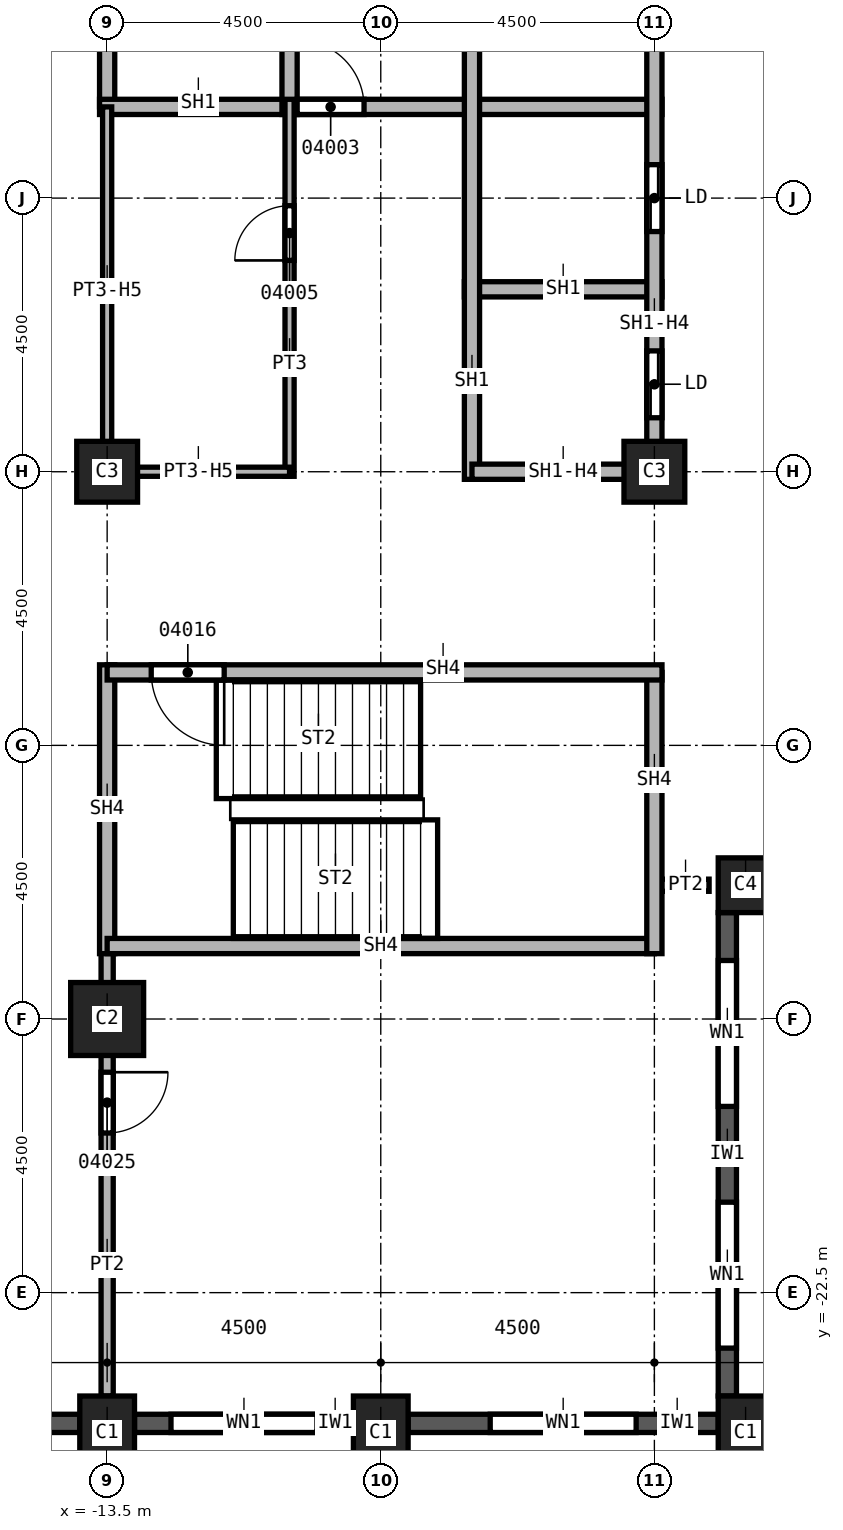
"""IFC4 building model, lengths in metres.
Left out: names, types, materials, properties, quantities, classifications, styles, units other than length and angle.
Written with IfcOpenShell. Run it as: python <this file> out.ifc"""

import sys

from ifc_helpers import new_model, si_unit, direction, frame, frame_2d, origin, origin_2d, place, context, subcontext, project, spatial, rectangle, extrude, element, fill, save


model = new_model("IFC4")
c1 = context("Model", 3, precision=1e-05, world=origin(), true_north=direction((0.0, 1.0)))
c2 = subcontext(c1, "Body", "Model", "MODEL_VIEW")
j1 = project(units=[si_unit("LENGTHUNIT", "METRE"), si_unit("PLANEANGLEUNIT", "RADIAN")], contexts=[c1])
p1 = place(None, origin())
s1 = spatial("IfcSite", under=j1, at=p1, CompositionType="ELEMENT")
p2 = place(p1, origin())
s2 = spatial("IfcBuilding", under=s1, at=p2, CompositionType="ELEMENT")
p3 = place(p2, frame((0.0, 0.0, 104.0)))
s3 = spatial("IfcBuildingStorey", under=s2, at=p3, CompositionType="ELEMENT", Elevation=104.0)
p4 = place(p3, frame((-13.5, -18.0, 0.0), z_axis=(0.0, 0.0, 1.0), x_axis=(1.0, 0.0, 0.0)))
e1 = element("IfcColumn", 1, at=p4, inside=s3, PredefinedType="COLUMN", context=c2, shape_type="SweptSolid", body=[
    extrude(rectangle(XDim=1.2, YDim=1.2, at=origin_2d()), origin(), (0.0, 0.0, 1.0), 3.7),
])
for number, where, z_axis, x_axis in (
    (2, (-4.5, -9.0, 0.0), (0.0, 0.0, 1.0), (1.0, 0.0, 0.0)),
    (3, (-13.5, -9.0, 0.0), (0.0, 0.0, 1.0), (1.0, 0.0, 0.0)),
):
    element("IfcColumn", number, at=place(p3, frame(where, z_axis=z_axis, x_axis=x_axis)), inside=s3, PredefinedType="COLUMN", context=c2, shape_type="SweptSolid", body=[
        extrude(rectangle(XDim=1.0, YDim=1.0, at=origin_2d()), origin(), (0.0, 0.0, 1.0), 3.7),
    ])
for number, where, z_axis, x_axis in (
    (4, (-3.0, -24.8, 0.0), (0.0, 0.0, 1.0), (1.0, 0.0, 0.0)),
    (5, (-9.0, -24.8, 0.0), (0.0, 0.0, 1.0), (1.0, 0.0, 0.0)),
    (6, (-13.5, -24.8, 0.0), (0.0, 0.0, 1.0), (1.0, 0.0, 0.0)),
):
    element("IfcColumn", number, at=place(p3, frame(where, z_axis=z_axis, x_axis=x_axis)), inside=s3, PredefinedType="COLUMN", context=c2, shape_type="SweptSolid", body=[
        extrude(rectangle(XDim=0.9, YDim=1.2, at=origin_2d()), origin(), (0.0, 0.0, 1.0), 3.7),
    ])
p5 = place(p3, frame((-3.0, -15.8, 0.0), z_axis=(0.0, 0.0, 1.0), x_axis=(1.0, 0.0, 0.0)))
e7 = element("IfcColumn", 7, at=p5, inside=s3, PredefinedType="COLUMN", context=c2, shape_type="SweptSolid", body=[
    extrude(rectangle(XDim=0.9, YDim=0.9, at=origin_2d()), origin(), (0.0, 0.0, 1.0), 3.7),
])
p6 = place(p3, frame((-17.55, -24.65, 0.0), z_axis=(0.0, 0.0, 1.0), x_axis=(1.0, 0.0, 0.0)))
e8 = element("IfcWall", 8, at=p6, inside=s3, PredefinedType="SOLIDWALL", context=c2, shape_type="SweptSolid", body=[
    extrude(rectangle(XDim=3.6, YDim=0.3, at=frame_2d((1.8, 0.0))), origin(), (0.0, 0.0, 1.0), 3.1),
])
p7 = place(p6, frame((0.775, 0.0, 0.8)))
e9 = element("IfcOpeningElement", 9, at=p7, cuts=e8, PredefinedType="OPENING", context=c2, shape_type="SweptSolid", body=[
    extrude(rectangle(XDim=1.0, YDim=1.95, at=frame_2d((0.5, 0.975))), frame((0.0, 0.15, 0.0), z_axis=(0.0, -1.0, 0.0), x_axis=(1.0, 0.0, 0.0)), (0.0, 0.0, 1.0), 0.3),
])
p8 = place(p6, frame((2.375, 0.0, 0.8)))
e10 = element("IfcOpeningElement", 10, at=p8, cuts=e8, PredefinedType="OPENING", context=c2, shape_type="SweptSolid", body=[
    extrude(rectangle(XDim=0.6, YDim=1.95, at=frame_2d((0.3, 0.975))), frame((0.0, 0.15, 0.0), z_axis=(0.0, -1.0, 0.0), x_axis=(1.0, 0.0, 0.0)), (0.0, 0.0, 1.0), 0.3),
])
p9 = place(p3, frame((-13.05, -24.65, 0.0), z_axis=(0.0, 0.0, 1.0), x_axis=(1.0, 0.0, 0.0)))
e11 = element("IfcWall", 11, at=p9, inside=s3, PredefinedType="SOLIDWALL", context=c2, shape_type="SweptSolid", body=[
    extrude(rectangle(XDim=3.6, YDim=0.3, at=frame_2d((1.8, 0.0))), origin(), (0.0, 0.0, 1.0), 3.1),
])
p10 = place(p9, frame((0.6, 0.0, 0.8)))
e12 = element("IfcOpeningElement", 12, at=p10, cuts=e11, PredefinedType="OPENING", context=c2, shape_type="SweptSolid", body=[
    extrude(rectangle(XDim=2.4, YDim=1.95, at=frame_2d((1.2, 0.975))), frame((0.0, 0.15, 0.0), z_axis=(0.0, -1.0, 0.0), x_axis=(1.0, 0.0, 0.0)), (0.0, 0.0, 1.0), 0.3),
])
p11 = place(p3, frame((-8.55, -24.65, 0.0), z_axis=(0.0, 0.0, 1.0), x_axis=(1.0, 0.0, 0.0)))
e13 = element("IfcWall", 13, at=p11, inside=s3, PredefinedType="SOLIDWALL", context=c2, shape_type="SweptSolid", body=[
    extrude(rectangle(XDim=5.1, YDim=0.3, at=frame_2d((2.55, 0.0))), origin(), (0.0, 0.0, 1.0), 3.1),
])
p12 = place(p11, frame((1.35, 0.0, 0.8)))
e14 = element("IfcOpeningElement", 14, at=p12, cuts=e13, PredefinedType="OPENING", context=c2, shape_type="SweptSolid", body=[
    extrude(rectangle(XDim=2.4, YDim=1.95, at=frame_2d((1.2, 0.975))), frame((0.0, 0.15, 0.0), z_axis=(0.0, -1.0, 0.0), x_axis=(1.0, 0.0, 0.0)), (0.0, 0.0, 1.0), 0.3),
])
p13 = place(p3, frame((-3.3, -24.2, 0.0), z_axis=(0.0, 0.0, 1.0), x_axis=(0.0, 1.0, 0.0)))
e15 = element("IfcWall", 15, at=p13, inside=s3, PredefinedType="SOLIDWALL", context=c2, shape_type="SweptSolid", body=[
    extrude(rectangle(XDim=7.95, YDim=0.3, at=frame_2d((3.975, 0.0))), origin(), (0.0, 0.0, 1.0), 3.1),
])
p14 = place(p13, frame((0.788, 0.0, 0.8)))
e16 = element("IfcOpeningElement", 16, at=p14, cuts=e15, PredefinedType="OPENING", context=c2, shape_type="SweptSolid", body=[
    extrude(rectangle(XDim=2.4, YDim=1.95, at=frame_2d((1.2, 0.975))), frame((0.0, 0.15, 0.0), z_axis=(0.0, -1.0, 0.0), x_axis=(1.0, 0.0, 0.0)), (0.0, 0.0, 1.0), 0.3),
])
p15 = place(p13, frame((4.762, 0.0, 0.8)))
e17 = element("IfcOpeningElement", 17, at=p15, cuts=e15, PredefinedType="OPENING", context=c2, shape_type="SweptSolid", body=[
    extrude(rectangle(XDim=2.4, YDim=1.95, at=frame_2d((1.2, 0.975))), frame((0.0, 0.15, 0.0), z_axis=(0.0, -1.0, 0.0), x_axis=(1.0, 0.0, 0.0)), (0.0, 0.0, 1.0), 0.3),
])
p16 = place(p3, frame((-13.5, -16.675, 0.0), z_axis=(0.0, 0.0, 1.0), x_axis=(0.0, -1.0, 0.0)))
e18 = element("IfcWall", 18, at=p16, inside=s3, PredefinedType="PARTITIONING", context=c2, shape_type="SweptSolid", body=[
    extrude(rectangle(XDim=7.525, YDim=0.2, at=frame_2d((3.762, 0.0))), origin(), (0.0, 0.0, 1.0), 3.7),
])
p17 = place(p16, frame((2.2, 0.0, 0.0)))
e19 = element("IfcOpeningElement", 19, at=p17, cuts=e18, PredefinedType="OPENING", context=c2, shape_type="SweptSolid", body=[
    extrude(rectangle(XDim=1.0, YDim=2.1, at=frame_2d((0.5, 1.05))), frame((0.0, 0.1, 0.0), z_axis=(0.0, -1.0, 0.0), x_axis=(1.0, 0.0, 0.0)), (0.0, 0.0, 1.0), 0.2),
])
p18 = place(p3, frame((-3.6, -15.8, 0.0), z_axis=(0.0, 0.0, 1.0), x_axis=(-1.0, 0.0, 0.0)))
e20 = element("IfcWall", 20, at=p18, inside=s3, PredefinedType="PARTITIONING", context=c2, shape_type="SweptSolid", body=[
    extrude(rectangle(XDim=0.9, YDim=0.2, at=frame_2d((0.45, 0.0))), origin(), (0.0, 0.0, 1.0), 3.7),
])
p19 = place(p3, frame((-13.5, -3.0, 0.0), z_axis=(0.0, 0.0, 1.0), x_axis=(0.0, 1.0, 0.0)))
e21 = element("IfcWall", 21, at=p19, inside=s3, PredefinedType="SOLIDWALL", context=c2, shape_type="SweptSolid", body=[
    extrude(rectangle(XDim=6.0, YDim=0.25, at=frame_2d((3.0, 0.0))), origin(), (0.0, 0.0, 1.0), 2.938),
])
p20 = place(p3, frame((-13.625, -3.0, 0.0), z_axis=(0.0, 0.0, 1.0), x_axis=(1.0, 0.0, 0.0)))
e22 = element("IfcWall", 22, at=p20, inside=s3, PredefinedType="SOLIDWALL", context=c2, shape_type="SweptSolid", body=[
    extrude(rectangle(XDim=9.25, YDim=0.25, at=frame_2d((4.625, 0.0))), origin(), (0.0, 0.0, 1.0), 3.7),
])
p21 = place(p20, frame((3.25, 0.0, 0.0)))
e23 = element("IfcOpeningElement", 23, at=p21, cuts=e22, PredefinedType="OPENING", context=c2, shape_type="SweptSolid", body=[
    extrude(rectangle(XDim=1.1, YDim=2.1, at=frame_2d((0.55, 1.05))), frame((0.0, 0.125, 0.0), z_axis=(0.0, -1.0, 0.0), x_axis=(1.0, 0.0, 0.0)), (0.0, 0.0, 1.0), 0.25),
])
p22 = place(p3, frame((-10.5, -3.125, 0.0), z_axis=(0.0, 0.0, 1.0), x_axis=(0.0, 1.0, 0.0)))
e24 = element("IfcWall", 24, at=p22, inside=s3, PredefinedType="SOLIDWALL", context=c2, shape_type="SweptSolid", body=[
    extrude(rectangle(XDim=6.25, YDim=0.25, at=frame_2d((3.125, 0.0))), origin(), (0.0, 0.0, 1.0), 3.7),
])
p23 = place(p22, frame((1.075, 0.0, 0.0)))
e25 = element("IfcOpeningElement", 25, at=p23, cuts=e24, PredefinedType="OPENING", context=c2, shape_type="SweptSolid", body=[
    extrude(rectangle(XDim=1.1, YDim=2.1, at=frame_2d((0.55, 1.05))), frame((0.0, 0.125, 0.0), z_axis=(0.0, -1.0, 0.0), x_axis=(1.0, 0.0, 0.0)), (0.0, 0.0, 1.0), 0.25),
])
p24 = place(p22, frame((4.075, 0.0, 0.0)))
e26 = element("IfcOpeningElement", 26, at=p24, cuts=e24, PredefinedType="OPENING", context=c2, shape_type="SweptSolid", body=[
    extrude(rectangle(XDim=1.1, YDim=2.1, at=frame_2d((0.55, 1.05))), frame((0.0, 0.125, 0.0), z_axis=(0.0, -1.0, 0.0), x_axis=(1.0, 0.0, 0.0)), (0.0, 0.0, 1.0), 0.25),
])
p25 = place(p3, frame((-7.625, -6.0, 0.0), z_axis=(0.0, 0.0, 1.0), x_axis=(1.0, 0.0, 0.0)))
e27 = element("IfcWall", 27, at=p25, inside=s3, PredefinedType="SOLIDWALL", context=c2, shape_type="SweptSolid", body=[
    extrude(rectangle(XDim=3.25, YDim=0.25, at=frame_2d((1.625, 0.0))), origin(), (0.0, 0.0, 1.0), 3.7),
])
p26 = place(p3, frame((-7.5, -9.125, 0.0), z_axis=(0.0, 0.0, 1.0), x_axis=(0.0, 1.0, 0.0)))
e28 = element("IfcWall", 28, at=p26, inside=s3, PredefinedType="SOLIDWALL", context=c2, shape_type="SweptSolid", body=[
    extrude(rectangle(XDim=12.25, YDim=0.25, at=frame_2d((6.125, 0.0))), origin(), (0.0, 0.0, 1.0), 3.7),
])
p27 = place(p3, frame((-4.5, -9.0, 0.0), z_axis=(0.0, 0.0, 1.0), x_axis=(-1.0, 0.0, 0.0)))
e29 = element("IfcWall", 29, at=p27, inside=s3, PredefinedType="SOLIDWALL", context=c2, shape_type="SweptSolid", body=[
    extrude(rectangle(XDim=3.0, YDim=0.25, at=frame_2d((1.5, 0.0))), origin(), (0.0, 0.0, 1.0), 2.938),
])
p28 = place(p3, frame((-4.5, 0.0, 0.0), z_axis=(0.0, 0.0, 1.0), x_axis=(0.0, -1.0, 0.0)))
e30 = element("IfcWall", 30, at=p28, inside=s3, PredefinedType="SOLIDWALL", context=c2, shape_type="SweptSolid", body=[
    extrude(rectangle(XDim=9.125, YDim=0.25, at=frame_2d((4.562, 0.0))), origin(), (0.0, 0.0, 1.0), 2.938),
])
p29 = place(p28, frame((7.012, 0.0, 0.0)))
e31 = element("IfcOpeningElement", 31, at=p29, cuts=e30, PredefinedType="OPENING", context=c2, shape_type="SweptSolid", body=[
    extrude(rectangle(XDim=1.1, YDim=2.1, at=frame_2d((0.55, 1.05))), frame((0.0, 0.125, 0.0), z_axis=(0.0, -1.0, 0.0), x_axis=(1.0, 0.0, 0.0)), (0.0, 0.0, 1.0), 0.25),
])
p30 = place(p28, frame((3.95, 0.0, 0.0)))
e32 = element("IfcOpeningElement", 32, at=p30, cuts=e30, PredefinedType="OPENING", context=c2, shape_type="SweptSolid", body=[
    extrude(rectangle(XDim=1.1, YDim=2.1, at=frame_2d((0.55, 1.05))), frame((0.0, 0.125, 0.0), z_axis=(0.0, -1.0, 0.0), x_axis=(1.0, 0.0, 0.0)), (0.0, 0.0, 1.0), 0.25),
])
p31 = place(p28, frame((0.95, 0.0, 0.0)))
e33 = element("IfcOpeningElement", 33, at=p31, cuts=e30, PredefinedType="OPENING", context=c2, shape_type="SweptSolid", body=[
    extrude(rectangle(XDim=1.1, YDim=2.1, at=frame_2d((0.55, 1.05))), frame((0.0, 0.125, 0.0), z_axis=(0.0, -1.0, 0.0), x_axis=(1.0, 0.0, 0.0)), (0.0, 0.0, 1.0), 0.25),
])
p32 = place(p3, frame((-13.5, -12.175, 0.0), z_axis=(0.0, 0.0, 1.0), x_axis=(0.0, -1.0, 0.0)))
e34 = element("IfcWall", 34, at=p32, inside=s3, PredefinedType="SOLIDWALL", context=c2, shape_type="SweptSolid", body=[
    extrude(rectangle(XDim=4.75, YDim=0.25, at=frame_2d((2.375, 0.0))), origin(), (0.0, 0.0, 1.0), 3.7),
])
p33 = place(p3, frame((-4.5, -16.8, 0.0), z_axis=(0.0, 0.0, 1.0), x_axis=(-1.0, 0.0, 0.0)))
e35 = element("IfcWall", 35, at=p33, inside=s3, PredefinedType="SOLIDWALL", context=c2, shape_type="SweptSolid", body=[
    extrude(rectangle(XDim=9.0, YDim=0.25, at=frame_2d((4.5, 0.0))), origin(), (0.0, 0.0, 1.0), 3.7),
])
p34 = place(p3, frame((-4.5, -12.3, 0.0), z_axis=(0.0, 0.0, 1.0), x_axis=(0.0, -1.0, 0.0)))
e36 = element("IfcWall", 36, at=p34, inside=s3, PredefinedType="SOLIDWALL", context=c2, shape_type="SweptSolid", body=[
    extrude(rectangle(XDim=4.625, YDim=0.25, at=frame_2d((2.312, 0.0))), origin(), (0.0, 0.0, 1.0), 3.7),
])
p35 = place(p3, frame((-4.375, -12.3, 0.0), z_axis=(0.0, 0.0, 1.0), x_axis=(-1.0, 0.0, 0.0)))
e37 = element("IfcWall", 37, at=p35, inside=s3, PredefinedType="SOLIDWALL", context=c2, shape_type="SweptSolid", body=[
    extrude(rectangle(XDim=9.125, YDim=0.25, at=frame_2d((4.562, 0.0))), origin(), (0.0, 0.0, 1.0), 3.7),
])
p36 = place(p35, frame((7.2, 0.0, 0.0)))
e38 = element("IfcOpeningElement", 38, at=p36, cuts=e37, PredefinedType="OPENING", context=c2, shape_type="SweptSolid", body=[
    extrude(rectangle(XDim=1.2, YDim=2.1, at=frame_2d((0.6, 1.05))), frame((0.0, 0.125, 0.0), z_axis=(0.0, -1.0, 0.0), x_axis=(1.0, 0.0, 0.0)), (0.0, 0.0, 1.0), 0.25),
])
p37 = place(p3, frame((-13.5, -9.075, 0.0), z_axis=(0.0, 0.0, 1.0), x_axis=(0.0, 1.0, 0.0)))
e39 = element("IfcWall", 39, at=p37, inside=s3, PredefinedType="PARTITIONING", context=c2, shape_type="SweptSolid", body=[
    extrude(rectangle(XDim=6.075, YDim=0.15, at=frame_2d((3.038, 0.0))), origin(), (0.0, 0.0, 1.0), 2.938),
])
p38 = place(p3, frame((-10.5, -9.075, 0.0), z_axis=(0.0, 0.0, 1.0), x_axis=(0.0, 1.0, 0.0)))
e40 = element("IfcWall", 40, at=p38, inside=s3, PredefinedType="PARTITIONING", context=c2, shape_type="SweptSolid", body=[
    extrude(rectangle(XDim=6.2, YDim=0.15, at=frame_2d((3.1, 0.0))), origin(), (0.0, 0.0, 1.0), 3.7),
])
p39 = place(p38, frame((3.55, 0.0, 0.0)))
e41 = element("IfcOpeningElement", 41, at=p39, cuts=e40, PredefinedType="OPENING", context=c2, shape_type="SweptSolid", body=[
    extrude(rectangle(XDim=0.9, YDim=2.1, at=frame_2d((0.45, 1.05))), frame((0.0, 0.075, 0.0), z_axis=(0.0, -1.0, 0.0), x_axis=(1.0, 0.0, 0.0)), (0.0, 0.0, 1.0), 0.15),
])
p40 = place(p3, frame((-10.5, -9.0, 0.0), z_axis=(0.0, 0.0, 1.0), x_axis=(-1.0, 0.0, 0.0)))
e42 = element("IfcWall", 42, at=p40, inside=s3, PredefinedType="PARTITIONING", context=c2, shape_type="SweptSolid", body=[
    extrude(rectangle(XDim=3.0, YDim=0.15, at=frame_2d((1.5, 0.0))), origin(), (0.0, 0.0, 1.0), 2.938),
])
p41 = place(p10, origin())
e43 = element("IfcWindow", 43, at=p41, inside=s3, PartitioningType="SINGLE_PANEL", PredefinedType="WINDOW", context=c2, shape_type="SweptSolid", body=[
    extrude(rectangle(XDim=2.4, YDim=1.95, at=frame_2d((1.2, 0.975))), frame((0.0, 0.03, 0.0), z_axis=(0.0, -1.0, 0.0), x_axis=(1.0, 0.0, 0.0)), (0.0, 0.0, 1.0), 0.06),
])
fill(e12, e43)
p42 = place(p12, origin())
e44 = element("IfcWindow", 44, at=p42, inside=s3, PartitioningType="SINGLE_PANEL", PredefinedType="WINDOW", context=c2, shape_type="SweptSolid", body=[
    extrude(rectangle(XDim=2.4, YDim=1.95, at=frame_2d((1.2, 0.975))), frame((0.0, 0.03, 0.0), z_axis=(0.0, -1.0, 0.0), x_axis=(1.0, 0.0, 0.0)), (0.0, 0.0, 1.0), 0.06),
])
fill(e14, e44)
p43 = place(p14, origin())
e45 = element("IfcWindow", 45, at=p43, inside=s3, PartitioningType="SINGLE_PANEL", PredefinedType="WINDOW", context=c2, shape_type="SweptSolid", body=[
    extrude(rectangle(XDim=2.4, YDim=1.95, at=frame_2d((1.2, 0.975))), frame((0.0, 0.03, 0.0), z_axis=(0.0, -1.0, 0.0), x_axis=(1.0, 0.0, 0.0)), (0.0, 0.0, 1.0), 0.06),
])
fill(e16, e45)
p44 = place(p15, origin())
e46 = element("IfcWindow", 46, at=p44, inside=s3, PartitioningType="SINGLE_PANEL", PredefinedType="WINDOW", context=c2, shape_type="SweptSolid", body=[
    extrude(rectangle(XDim=2.4, YDim=1.95, at=frame_2d((1.2, 0.975))), frame((0.0, 0.03, 0.0), z_axis=(0.0, -1.0, 0.0), x_axis=(1.0, 0.0, 0.0)), (0.0, 0.0, 1.0), 0.06),
])
fill(e17, e46)
p45 = place(p21, origin())
e47 = element("IfcDoor", 47, at=p45, inside=s3, OperationType="SINGLE_SWING_RIGHT", PredefinedType="DOOR", context=c2, shape_type="SweptSolid", body=[
    extrude(rectangle(XDim=1.1, YDim=2.1, at=frame_2d((0.55, 1.05))), frame((0.0, 0.025, 0.0), z_axis=(0.0, -1.0, 0.0), x_axis=(1.0, 0.0, 0.0)), (0.0, 0.0, 1.0), 0.05),
])
fill(e23, e47)
p46 = place(p39, origin())
e48 = element("IfcDoor", 48, at=p46, inside=s3, OperationType="SINGLE_SWING_RIGHT", PredefinedType="DOOR", context=c2, shape_type="SweptSolid", body=[
    extrude(rectangle(XDim=0.9, YDim=2.1, at=frame_2d((0.45, 1.05))), frame((0.0, 0.025, 0.0), z_axis=(0.0, -1.0, 0.0), x_axis=(1.0, 0.0, 0.0)), (0.0, 0.0, 1.0), 0.05),
])
fill(e41, e48)
p47 = place(p36, origin())
e49 = element("IfcDoor", 49, at=p47, inside=s3, OperationType="SINGLE_SWING_LEFT", PredefinedType="DOOR", context=c2, shape_type="SweptSolid", body=[
    extrude(rectangle(XDim=1.2, YDim=2.1, at=frame_2d((0.6, 1.05))), frame((0.0, 0.025, 0.0), z_axis=(0.0, -1.0, 0.0), x_axis=(1.0, 0.0, 0.0)), (0.0, 0.0, 1.0), 0.05),
])
fill(e38, e49)
p48 = place(p17, origin())
e50 = element("IfcDoor", 50, at=p48, inside=s3, OperationType="SINGLE_SWING_RIGHT", PredefinedType="DOOR", context=c2, shape_type="SweptSolid", body=[
    extrude(rectangle(XDim=1.0, YDim=2.1, at=frame_2d((0.5, 1.05))), frame((0.0, 0.025, 0.0), z_axis=(0.0, -1.0, 0.0), x_axis=(1.0, 0.0, 0.0)), (0.0, 0.0, 1.0), 0.05),
])
fill(e19, e50)
p49 = place(p29, origin())
e51 = element("IfcDoor", 51, at=p49, inside=s3, OperationType="SLIDING_TO_LEFT", PredefinedType="DOOR", context=c2, shape_type="SweptSolid", body=[
    extrude(rectangle(XDim=1.1, YDim=2.1, at=frame_2d((0.55, 1.05))), frame((0.0, 0.025, 0.0), z_axis=(0.0, -1.0, 0.0), x_axis=(1.0, 0.0, 0.0)), (0.0, 0.0, 1.0), 0.05),
])
fill(e31, e51)
p50 = place(p30, origin())
e52 = element("IfcDoor", 52, at=p50, inside=s3, OperationType="SLIDING_TO_LEFT", PredefinedType="DOOR", context=c2, shape_type="SweptSolid", body=[
    extrude(rectangle(XDim=1.1, YDim=2.1, at=frame_2d((0.55, 1.05))), frame((0.0, 0.025, 0.0), z_axis=(0.0, -1.0, 0.0), x_axis=(1.0, 0.0, 0.0)), (0.0, 0.0, 1.0), 0.05),
])
fill(e32, e52)
save(model, sys.argv[1])
